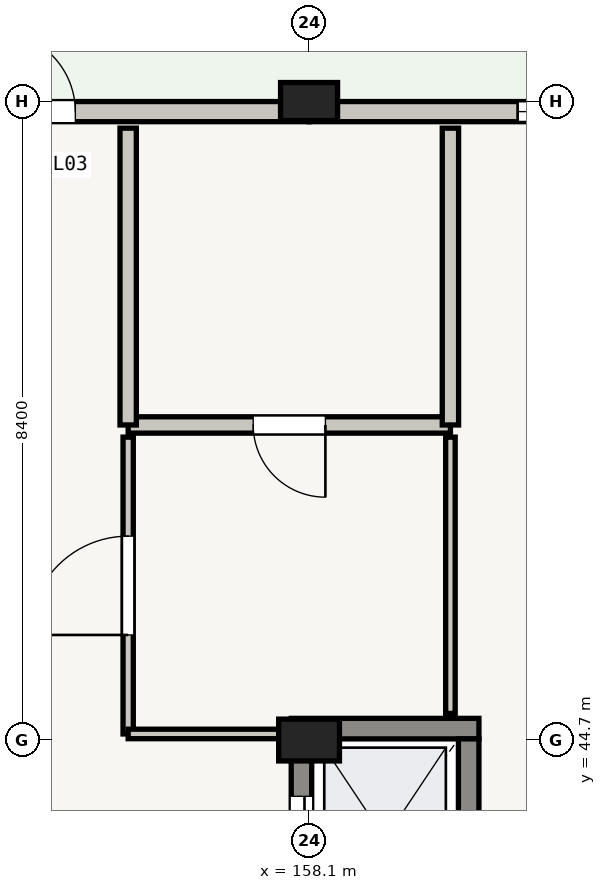
"""IFC4 building model, lengths in metres.
Left out: names, types, materials, properties, quantities, classifications, styles, units other than length and angle.
Written with IfcOpenShell. Run it as: python <this file> out.ifc"""

import sys

from ifc_helpers import new_model, si_unit, direction, frame, frame_2d, origin, origin_2d, place, context, subcontext, project, spatial, rectangle, extrude, element, fill, save


model = new_model("IFC4")
c1 = context("Model", 3, precision=1e-05, world=origin(), true_north=direction((0.0, 1.0)))
c2 = subcontext(c1, "Body", "Model", "MODEL_VIEW")
j1 = project(units=[si_unit("LENGTHUNIT", "METRE"), si_unit("PLANEANGLEUNIT", "RADIAN")], contexts=[c1])
p1 = place(None, origin())
s1 = spatial("IfcSite", under=j1, at=p1, CompositionType="ELEMENT")
p2 = place(p1, origin())
s2 = spatial("IfcBuilding", under=s1, at=p2, CompositionType="ELEMENT")
p3 = place(p2, frame((0.0, 0.0, 12.9)))
s3 = spatial("IfcBuildingStorey", under=s2, at=p3, CompositionType="ELEMENT", Elevation=12.9)
p4 = place(p3, frame((158.1, 44.7, 0.0), z_axis=(0.0, 0.0, 1.0), x_axis=(1.0, 0.0, 0.0)))
e1 = element("IfcColumn", 1, at=p4, inside=s3, PredefinedType="COLUMN", context=c2, shape_type="SweptSolid", body=[
    extrude(rectangle(XDim=0.8, YDim=0.55, at=origin_2d()), origin(), (0.0, 0.0, 1.0), 3.96),
])
p5 = place(p3, frame((158.1, 53.1, 0.0), z_axis=(0.0, 0.0, 1.0), x_axis=(1.0, 0.0, 0.0)))
e2 = element("IfcColumn", 2, at=p5, inside=s3, PredefinedType="COLUMN", context=c2, shape_type="SweptSolid", body=[
    extrude(rectangle(XDim=0.75, YDim=0.5, at=origin_2d()), origin(), (0.0, 0.0, 1.0), 3.96),
])
p6 = place(p3, frame((150.9, 52.968, 0.0), z_axis=(0.0, 0.0, 1.0), x_axis=(1.0, 0.0, 0.0)))
e3 = element("IfcWall", 3, at=p6, inside=s3, PredefinedType="STANDARD", context=c2, shape_type="SweptSolid", body=[
    extrude(rectangle(XDim=7.2, YDim=0.265, at=frame_2d((3.6, 0.0))), origin(), (0.0, 0.0, 1.0), 3.295),
])
p7 = place(p6, frame((3.075, 0.0, 0.17)))
e4 = element("IfcOpeningElement", 4, at=p7, cuts=e3, PredefinedType="OPENING", context=c2, shape_type="SweptSolid", body=[
    extrude(rectangle(XDim=1.05, YDim=2.02, at=frame_2d((0.525, 1.01))), frame((0.0, 0.132, 0.0), z_axis=(0.0, -1.0, 0.0), x_axis=(1.0, 0.0, 0.0)), (0.0, 0.0, 1.0), 0.265),
])
p8 = place(p3, frame((158.1, 52.968, 0.0), z_axis=(0.0, 0.0, 1.0), x_axis=(1.0, 0.0, 0.0)))
e5 = element("IfcWall", 5, at=p8, inside=s3, PredefinedType="STANDARD", context=c2, shape_type="SweptSolid", body=[
    extrude(rectangle(XDim=7.2, YDim=0.265, at=frame_2d((3.6, 0.0))), origin(), (0.0, 0.0, 1.0), 3.295),
])
p9 = place(p8, frame((2.744, 0.0, 0.55)))
e6 = element("IfcOpeningElement", 6, at=p9, cuts=e5, PredefinedType="OPENING", context=c2, shape_type="SweptSolid", body=[
    extrude(rectangle(XDim=0.92, YDim=2.1, at=frame_2d((0.46, 1.05))), frame((0.0, 0.132, 0.0), z_axis=(0.0, -1.0, 0.0), x_axis=(1.0, 0.0, 0.0)), (0.0, 0.0, 1.0), 0.265),
])
p10 = place(p8, frame((4.436, 0.0, 0.55)))
e7 = element("IfcOpeningElement", 7, at=p10, cuts=e5, PredefinedType="OPENING", context=c2, shape_type="SweptSolid", body=[
    extrude(rectangle(XDim=0.92, YDim=2.1, at=frame_2d((0.46, 1.05))), frame((0.0, 0.132, 0.0), z_axis=(0.0, -1.0, 0.0), x_axis=(1.0, 0.0, 0.0)), (0.0, 0.0, 1.0), 0.265),
])
p11 = place(p3, frame((158.0, 42.085, 0.0), z_axis=(0.0, 0.0, 1.0), x_axis=(0.0, 1.0, 0.0)))
e8 = element("IfcWall", 8, at=p11, inside=s3, PredefinedType="SHEAR", context=c2, shape_type="SweptSolid", body=[
    extrude(rectangle(XDim=2.63, YDim=0.27, at=frame_2d((1.315, 0.0))), origin(), (0.0, 0.0, 1.0), 3.95),
])
p12 = place(p11, frame((0.755, 0.0, 0.0)))
e9 = element("IfcOpeningElement", 9, at=p12, cuts=e8, PredefinedType="OPENING", context=c2, shape_type="SweptSolid", body=[
    extrude(rectangle(XDim=1.12, YDim=2.1, at=frame_2d((0.56, 1.05))), frame((0.0, 0.135, 0.0), z_axis=(0.0, -1.0, 0.0), x_axis=(1.0, 0.0, 0.0)), (0.0, 0.0, 1.0), 0.27),
])
p13 = place(p3, frame((157.865, 44.85, 0.0), z_axis=(0.0, 0.0, 1.0), x_axis=(1.0, 0.0, 0.0)))
e10 = element("IfcWall", 10, at=p13, inside=s3, PredefinedType="SHEAR", context=c2, shape_type="SweptSolid", body=[
    extrude(rectangle(XDim=2.47, YDim=0.27, at=frame_2d((1.235, 0.0))), origin(), (0.0, 0.0, 1.0), 3.95),
])
p14 = place(p3, frame((160.2, 44.715, 0.0), z_axis=(0.0, 0.0, 1.0), x_axis=(0.0, -1.0, 0.0)))
e11 = element("IfcWall", 11, at=p14, inside=s3, PredefinedType="SHEAR", context=c2, shape_type="SweptSolid", body=[
    extrude(rectangle(XDim=2.63, YDim=0.27, at=frame_2d((1.315, 0.0))), origin(), (0.0, 0.0, 1.0), 3.95),
])
p15 = place(p3, frame((159.96, 48.845, 0.0), z_axis=(0.0, 0.0, 1.0), x_axis=(-1.0, 0.0, 0.0)))
e12 = element("IfcWall", 12, at=p15, inside=s3, PredefinedType="PLUMBINGWALL", context=c2, shape_type="SweptSolid", body=[
    extrude(rectangle(XDim=4.24, YDim=0.215, at=frame_2d((2.12, 0.0))), origin(), (0.0, 0.0, 1.0), 2.97),
])
p16 = place(p15, frame((1.645, 0.0, 0.0)))
e13 = element("IfcOpeningElement", 13, at=p16, cuts=e12, PredefinedType="OPENING", context=c2, shape_type="SweptSolid", body=[
    extrude(rectangle(XDim=0.95, YDim=2.05, at=frame_2d((0.475, 1.025))), frame((0.0, 0.107, 0.0), z_axis=(0.0, -1.0, 0.0), x_axis=(1.0, 0.0, 0.0)), (0.0, 0.0, 1.0), 0.215),
])
for number, where, z_axis, x_axis in (
    (14, (159.96, 52.75, 0.0), (0.0, 0.0, 1.0), (0.0, -1.0, 0.0)),
    (15, (155.72, 48.845, 0.0), (0.0, 0.0, 1.0), (0.0, 1.0, 0.0)),
):
    element("IfcWall", number, at=place(p3, frame(where, z_axis=z_axis, x_axis=x_axis)), inside=s3, PredefinedType="PLUMBINGWALL", context=c2, shape_type="SweptSolid", body=[
        extrude(rectangle(XDim=3.905, YDim=0.215, at=frame_2d((1.953, 0.0))), origin(), (0.0, 0.0, 1.0), 2.97),
    ])
p17 = place(p3, frame((155.72, 44.78, 0.0), z_axis=(0.0, 0.0, 1.0), x_axis=(0.0, 1.0, 0.0)))
e16 = element("IfcWall", 16, at=p17, inside=s3, PredefinedType="MOVABLE", context=c2, shape_type="SweptSolid", body=[
    extrude(rectangle(XDim=3.905, YDim=0.135, at=frame_2d((1.953, 0.0))), origin(), (0.0, 0.0, 1.0), 2.97),
])
p18 = place(p17, frame((1.302, 0.0, 0.0)))
e17 = element("IfcOpeningElement", 17, at=p18, cuts=e16, PredefinedType="OPENING", context=c2, shape_type="SweptSolid", body=[
    extrude(rectangle(XDim=1.3, YDim=2.1, at=frame_2d((0.65, 1.05))), frame((0.0, 0.067, 0.0), z_axis=(0.0, -1.0, 0.0), x_axis=(1.0, 0.0, 0.0)), (0.0, 0.0, 1.0), 0.135),
])
p19 = place(p3, frame((157.8, 44.78, 0.0), z_axis=(0.0, 0.0, 1.0), x_axis=(-1.0, 0.0, 0.0)))
e18 = element("IfcWall", 18, at=p19, inside=s3, PredefinedType="PARTITIONING", context=c2, shape_type="SweptSolid", body=[
    extrude(rectangle(XDim=2.08, YDim=0.125, at=frame_2d((1.04, 0.0))), origin(), (0.0, 0.0, 1.0), 2.97),
])
p20 = place(p3, frame((159.96, 48.685, 0.0), z_axis=(0.0, 0.0, 1.0), x_axis=(0.0, -1.0, 0.0)))
e19 = element("IfcWall", 19, at=p20, inside=s3, PredefinedType="PARTITIONING", context=c2, shape_type="SweptSolid", body=[
    extrude(rectangle(XDim=3.635, YDim=0.125, at=frame_2d((1.817, 0.0))), origin(), (0.0, 0.0, 1.0), 2.97),
])
p21 = place(p7, origin())
e20 = element("IfcDoor", 20, at=p21, inside=s3, OperationType="SINGLE_SWING_LEFT", PredefinedType="DOOR", context=c2, shape_type="SweptSolid", body=[
    extrude(rectangle(XDim=1.05, YDim=2.02, at=frame_2d((0.525, 1.01))), frame((0.0, 0.025, 0.0), z_axis=(0.0, -1.0, 0.0), x_axis=(1.0, 0.0, 0.0)), (0.0, 0.0, 1.0), 0.05),
])
fill(e4, e20)
p22 = place(p9, origin())
e21 = element("IfcWindow", 21, at=p22, inside=s3, PartitioningType="DOUBLE_PANEL_VERTICAL", PredefinedType="WINDOW", context=c2, shape_type="SweptSolid", body=[
    extrude(rectangle(XDim=0.92, YDim=2.1, at=frame_2d((0.46, 1.05))), frame((0.0, 0.03, 0.0), z_axis=(0.0, -1.0, 0.0), x_axis=(1.0, 0.0, 0.0)), (0.0, 0.0, 1.0), 0.06),
])
fill(e6, e21)
p23 = place(p12, origin())
e22 = element("IfcDoor", 22, at=p23, inside=s3, OperationType="DOUBLE_DOOR_SLIDING", PredefinedType="DOOR", context=c2, shape_type="SweptSolid", body=[
    extrude(rectangle(XDim=1.12, YDim=2.1, at=frame_2d((0.56, 1.05))), frame((0.0, 0.025, 0.0), z_axis=(0.0, -1.0, 0.0), x_axis=(1.0, 0.0, 0.0)), (0.0, 0.0, 1.0), 0.05),
])
fill(e9, e22)
p24 = place(p16, origin())
e23 = element("IfcDoor", 23, at=p24, inside=s3, OperationType="SINGLE_SWING_LEFT", PredefinedType="DOOR", context=c2, shape_type="SweptSolid", body=[
    extrude(rectangle(XDim=0.95, YDim=2.05, at=frame_2d((0.475, 1.025))), frame((0.0, 0.025, 0.0), z_axis=(0.0, -1.0, 0.0), x_axis=(1.0, 0.0, 0.0)), (0.0, 0.0, 1.0), 0.05),
])
fill(e13, e23)
p25 = place(p18, origin())
e24 = element("IfcDoor", 24, at=p25, inside=s3, OperationType="SINGLE_SWING_LEFT", PredefinedType="DOOR", context=c2, shape_type="SweptSolid", body=[
    extrude(rectangle(XDim=1.3, YDim=2.1, at=frame_2d((0.65, 1.05))), frame((0.0, 0.025, 0.0), z_axis=(0.0, -1.0, 0.0), x_axis=(1.0, 0.0, 0.0)), (0.0, 0.0, 1.0), 0.05),
])
fill(e17, e24)
save(model, sys.argv[1])
